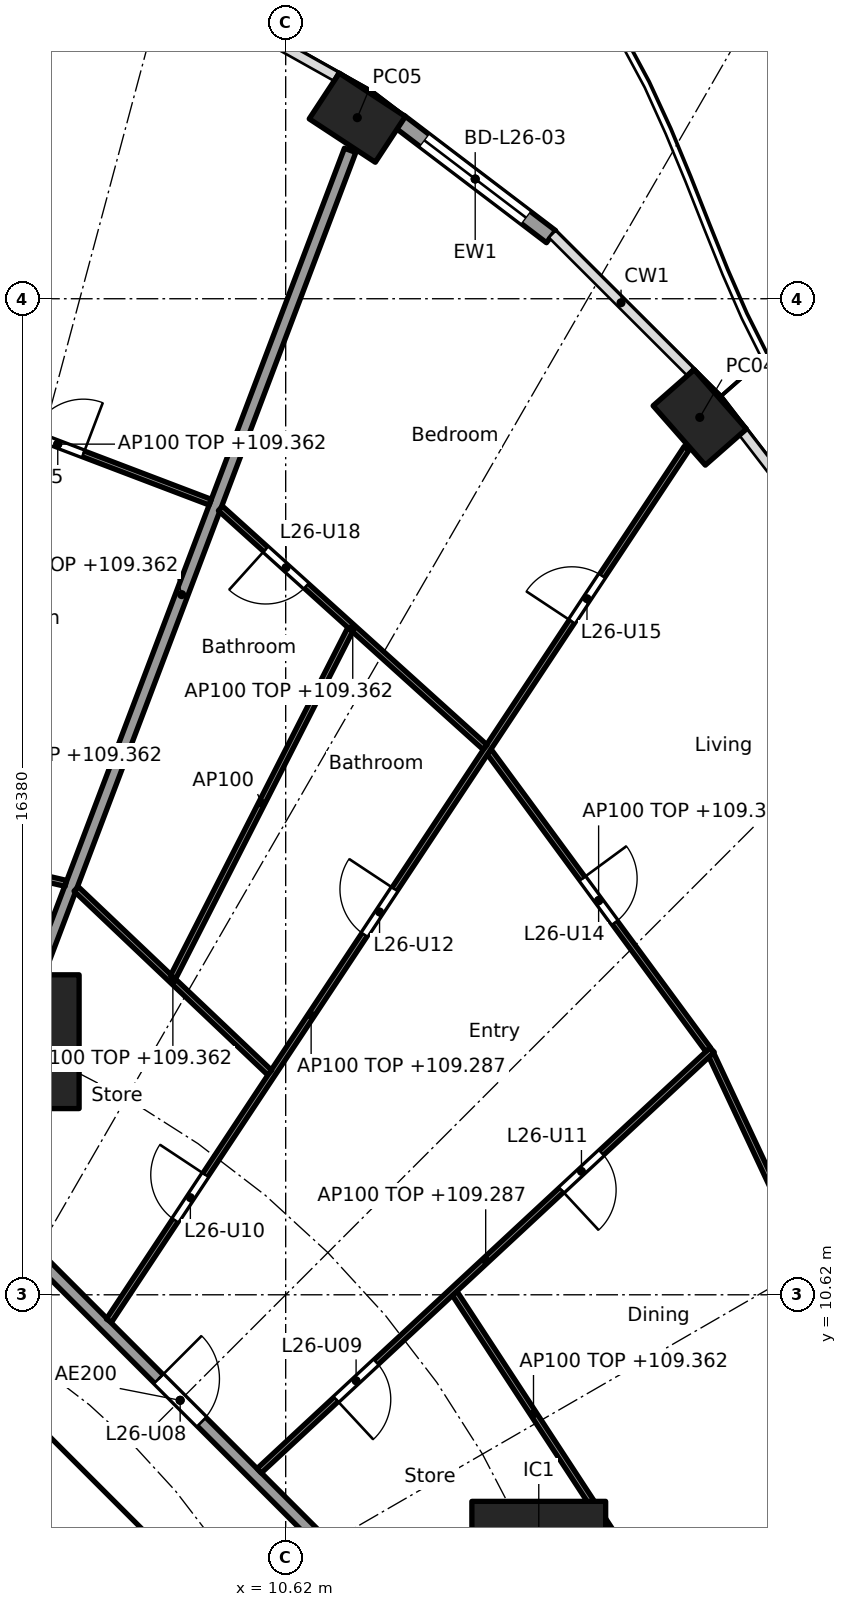
"""IFC4 building model, lengths in metres.
Left out: names, types, materials, properties, quantities, classifications, styles, units other than length and angle.
Written with IfcOpenShell. Run it as: python <this file> out.ifc"""

import sys

from ifc_helpers import new_model, si_unit, direction, frame, frame_2d, origin, origin_2d, place, context, subcontext, project, spatial, rectangle, hollow_rectangle, extrude, element, fill, save


model = new_model("IFC4")
c1 = context("Model", 3, precision=1e-05, world=origin(), true_north=direction((0.0, 1.0)))
c2 = subcontext(c1, "Body", "Model", "MODEL_VIEW")
j1 = project(units=[si_unit("LENGTHUNIT", "METRE"), si_unit("PLANEANGLEUNIT", "RADIAN")], contexts=[c1])
p1 = place(None, origin())
s1 = spatial("IfcSite", under=j1, at=p1, CompositionType="ELEMENT")
p2 = place(p1, origin())
s2 = spatial("IfcBuilding", under=s1, at=p2, CompositionType="ELEMENT")
p3 = place(p2, frame((0.0, 0.0, 106.6)))
s3 = spatial("IfcBuildingStorey", under=s2, at=p3, CompositionType="ELEMENT", Elevation=106.6)
for number, where, z_axis, x_axis in (
    (1, (17.43, 25.049, 0.0), (0.0, 0.0, 1.0), (-0.66, 0.751, 0.0)),
    (2, (11.798, 29.978, 0.0), (0.0, 0.0, 1.0), (-0.836, 0.549, 0.0)),
):
    element("IfcColumn", number, at=place(p3, frame(where, z_axis=z_axis, x_axis=x_axis)), inside=s3, PredefinedType="COLUMN", context=c2, shape_type="SweptSolid", body=[
        extrude(hollow_rectangle(XDim=1.3, YDim=0.9, WallThickness=0.045, at=origin_2d()), origin(), (0.0, 0.0, 1.0), 3.7),
    ])
for number, where, z_axis, x_axis in (
    (3, (14.782, 6.123, 0.0), (0.0, 0.0, 1.0), (1.0, 0.0, 0.0)),
    (4, (6.123, 14.782, 0.0), (0.0, 0.0, 1.0), (1.0, 0.0, 0.0)),
):
    element("IfcColumn", number, at=place(p3, frame(where, z_axis=z_axis, x_axis=x_axis)), inside=s3, PredefinedType="COLUMN", context=c2, shape_type="SweptSolid", body=[
        extrude(rectangle(XDim=2.2, YDim=2.2, at=origin_2d()), origin(), (0.0, 0.0, 1.0), 3.7),
    ])
p4 = place(p3, frame((12.489, 29.917, 0.0), z_axis=(0.0, 0.0, 1.0), x_axis=(0.796037575978, -0.605247203736, 0.0)))
e5 = element("IfcWall", 5, at=p4, inside=s3, PredefinedType="SOLIDWALL", context=c2, shape_type="SweptSolid", body=[
    extrude(rectangle(XDim=3.134, YDim=0.25, at=frame_2d((1.567, 0.0))), origin(), (0.0, 0.0, 1.0), 3.44),
])
p5 = place(p4, frame((0.517, 0.0, 0.0)))
e6 = element("IfcOpeningElement", 6, at=p5, cuts=e5, PredefinedType="OPENING", context=c2, shape_type="SweptSolid", body=[
    extrude(rectangle(XDim=2.1, YDim=2.4, at=frame_2d((1.05, 1.2))), frame((0.0, 0.135, 0.0), z_axis=(0.0, -1.0, 0.0), x_axis=(1.0, 0.0, 0.0)), (0.0, 0.0, 1.0), 0.27),
])
p6 = place(p3, frame((9.988, 4.613, 0.0), z_axis=(0.0, 0.0, 1.0), x_axis=(-0.707106781187, 0.707106781187, 0.0)))
e7 = element("IfcWall", 7, at=p6, inside=s3, PredefinedType="SHEAR", context=c2, shape_type="SweptSolid", body=[
    extrude(rectangle(XDim=7.602, YDim=0.6, at=frame_2d((3.801, 0.0))), origin(), (0.0, 0.0, 1.0), 3.44),
])
p7 = place(p6, frame((3.201, 0.0, 0.0)))
e8 = element("IfcOpeningElement", 8, at=p7, cuts=e7, PredefinedType="OPENING", context=c2, shape_type="SweptSolid", body=[
    extrude(rectangle(XDim=1.2, YDim=2.1, at=frame_2d((0.6, 1.05))), frame((0.0, 0.31, 0.0), z_axis=(0.0, -1.0, 0.0), x_axis=(1.0, 0.0, 0.0)), (0.0, 0.0, 1.0), 0.62),
])
p8 = place(p3, frame((6.141, 14.829, 0.0), z_axis=(0.0, 0.0, 1.0), x_axis=(0.354477134193, 0.935064682968, 0.0)))
e9 = element("IfcWall", 9, at=p8, inside=s3, PredefinedType="PARTITIONING", context=c2, shape_type="SweptSolid", body=[
    extrude(rectangle(XDim=15.626, YDim=0.2, at=frame_2d((7.813, 0.0))), origin(), (0.0, 0.0, 1.0), 2.762),
])
p9 = place(p3, frame((12.635, 5.134, 0.0), z_axis=(0.0, 0.0, 1.0), x_axis=(-0.707106781187, 0.707106781187, 0.0)))
e10 = element("IfcWall", 10, at=p9, inside=s3, PredefinedType="PARTITIONING", context=c2, shape_type="SweptSolid", body=[
    extrude(rectangle(XDim=10.609, YDim=0.2, at=frame_2d((5.305, 0.0))), origin(), (0.0, 0.0, 1.0), 3.44),
])
p10 = place(p9, frame((4.804, 0.0, 0.0)))
e11 = element("IfcOpeningElement", 11, at=p10, cuts=e10, PredefinedType="OPENING", context=c2, shape_type="SweptSolid", body=[
    extrude(rectangle(XDim=1.0, YDim=2.1, at=frame_2d((0.5, 1.05))), frame((0.0, 0.11, 0.0), z_axis=(0.0, -1.0, 0.0), x_axis=(1.0, 0.0, 0.0)), (0.0, 0.0, 1.0), 0.22),
])
p11 = place(p3, frame((15.992, 6.68, 0.0), z_axis=(0.0, 0.0, 1.0), x_axis=(-0.547472878942, 0.836823426311, 0.0)))
e12 = element("IfcWall", 12, at=p11, inside=s3, PredefinedType="PARTITIONING", context=c2, shape_type="SweptSolid", body=[
    extrude(rectangle(XDim=4.738, YDim=0.1, at=frame_2d((2.369, 0.0))), origin(), (0.0, 0.0, 1.0), 2.762),
])
p12 = place(p3, frame((20.252, 8.95, 0.0), z_axis=(0.0, 0.0, 1.0), x_axis=(-0.424580052627, 0.90539040138, 0.0)))
e13 = element("IfcWall", 13, at=p12, inside=s3, PredefinedType="PARTITIONING", context=c2, shape_type="SweptSolid", body=[
    extrude(rectangle(XDim=6.204, YDim=0.1, at=frame_2d((3.102, 0.0))), origin(), (0.0, 0.0, 1.0), 2.762),
])
p13 = place(p3, frame((10.185, 7.726, 0.0), z_axis=(0.0, 0.0, 1.0), x_axis=(0.732598472978, 0.680661059112, 0.0)))
e14 = element("IfcWall", 14, at=p13, inside=s3, PredefinedType="PARTITIONING", context=c2, shape_type="SweptSolid", body=[
    extrude(rectangle(XDim=10.167, YDim=0.1, at=frame_2d((5.084, 0.0))), origin(), (0.0, 0.0, 1.0), 2.687),
])
p14 = place(p13, frame((1.725, 0.0, 0.0)))
e15 = element("IfcOpeningElement", 15, at=p14, cuts=e14, PredefinedType="OPENING", context=c2, shape_type="SweptSolid", body=[
    extrude(rectangle(XDim=0.9, YDim=2.1, at=frame_2d((0.45, 1.05))), frame((0.0, 0.06, 0.0), z_axis=(0.0, -1.0, 0.0), x_axis=(1.0, 0.0, 0.0)), (0.0, 0.0, 1.0), 0.12),
])
p15 = place(p13, frame((6.784, 0.0, 0.0)))
e16 = element("IfcOpeningElement", 16, at=p15, cuts=e14, PredefinedType="OPENING", context=c2, shape_type="SweptSolid", body=[
    extrude(rectangle(XDim=0.9, YDim=2.1, at=frame_2d((0.45, 1.05))), frame((0.0, 0.06, 0.0), z_axis=(0.0, -1.0, 0.0), x_axis=(1.0, 0.0, 0.0)), (0.0, 0.0, 1.0), 0.12),
])
p16 = place(p3, frame((17.567, 14.653, 0.0), z_axis=(0.0, 0.0, 1.0), x_axis=(-0.592391983588, 0.80564988536, 0.0)))
e17 = element("IfcWall", 17, at=p16, inside=s3, PredefinedType="PARTITIONING", context=c2, shape_type="SweptSolid", body=[
    extrude(rectangle(XDim=6.08, YDim=0.1, at=frame_2d((3.04, 0.0))), origin(), (0.0, 0.0, 1.0), 2.762),
])
p17 = place(p16, frame((2.59, 0.0, 0.0)))
e18 = element("IfcOpeningElement", 18, at=p17, cuts=e17, PredefinedType="OPENING", context=c2, shape_type="SweptSolid", body=[
    extrude(rectangle(XDim=0.9, YDim=2.1, at=frame_2d((0.45, 1.05))), frame((0.0, 0.06, 0.0), z_axis=(0.0, -1.0, 0.0), x_axis=(1.0, 0.0, 0.0)), (0.0, 0.0, 1.0), 0.12),
])
p18 = place(p3, frame((7.713, 10.195, 0.0), z_axis=(0.0, 0.0, 1.0), x_axis=(0.552111071171, 0.833770571015, 0.0)))
e19 = element("IfcWall", 19, at=p18, inside=s3, PredefinedType="PARTITIONING", context=c2, shape_type="SweptSolid", body=[
    extrude(rectangle(XDim=17.208, YDim=0.1, at=frame_2d((8.604, 0.0))), origin(), (0.0, 0.0, 1.0), 2.687),
])
p19 = place(p18, frame((1.976, 0.0, 0.0)))
e20 = element("IfcOpeningElement", 20, at=p19, cuts=e19, PredefinedType="OPENING", context=c2, shape_type="SweptSolid", body=[
    extrude(rectangle(XDim=0.9, YDim=2.1, at=frame_2d((0.45, 1.05))), frame((0.0, 0.06, 0.0), z_axis=(0.0, -1.0, 0.0), x_axis=(1.0, 0.0, 0.0)), (0.0, 0.0, 1.0), 0.12),
])
p20 = place(p18, frame((7.611, 0.0, 0.0)))
e21 = element("IfcOpeningElement", 21, at=p20, cuts=e19, PredefinedType="OPENING", context=c2, shape_type="SweptSolid", body=[
    extrude(rectangle(XDim=0.9, YDim=2.1, at=frame_2d((0.45, 1.05))), frame((0.0, 0.06, 0.0), z_axis=(0.0, -1.0, 0.0), x_axis=(1.0, 0.0, 0.0)), (0.0, 0.0, 1.0), 0.12),
])
p21 = place(p18, frame((13.79, 0.0, 0.0)))
e22 = element("IfcOpeningElement", 22, at=p21, cuts=e19, PredefinedType="OPENING", context=c2, shape_type="SweptSolid", body=[
    extrude(rectangle(XDim=0.9, YDim=2.1, at=frame_2d((0.45, 1.05))), frame((0.0, 0.06, 0.0), z_axis=(0.0, -1.0, 0.0), x_axis=(1.0, 0.0, 0.0)), (0.0, 0.0, 1.0), 0.12),
])
p22 = place(p3, frame((10.355, 14.274, 0.0), z_axis=(0.0, 0.0, 1.0), x_axis=(-0.725206433622, 0.688531501555, 0.0)))
e23 = element("IfcWall", 23, at=p22, inside=s3, PredefinedType="PARTITIONING", context=c2, shape_type="SweptSolid", body=[
    extrude(rectangle(XDim=4.387, YDim=0.1, at=frame_2d((2.193, 0.0))), origin(), (0.0, 0.0, 1.0), 2.762),
])
p23 = place(p3, frame((13.898, 19.625, 0.0), z_axis=(0.0, 0.0, 1.0), x_axis=(-0.742396654702, 0.669960601146, 0.0)))
e24 = element("IfcWall", 24, at=p23, inside=s3, PredefinedType="PARTITIONING", context=c2, shape_type="SweptSolid", body=[
    extrude(rectangle(XDim=5.861, YDim=0.1, at=frame_2d((2.931, 0.0))), origin(), (0.0, 0.0, 1.0), 2.762),
])
p24 = place(p23, frame((3.958, 0.0, 0.0)))
e25 = element("IfcOpeningElement", 25, at=p24, cuts=e24, PredefinedType="OPENING", context=c2, shape_type="SweptSolid", body=[
    extrude(rectangle(XDim=0.9, YDim=2.1, at=frame_2d((0.45, 1.05))), frame((0.0, 0.06, 0.0), z_axis=(0.0, -1.0, 0.0), x_axis=(1.0, 0.0, 0.0)), (0.0, 0.0, 1.0), 0.12),
])
p25 = place(p3, frame((8.769, 15.846, 0.0), z_axis=(0.0, 0.0, 1.0), x_axis=(0.454067187552, 0.890967445639, 0.0)))
e26 = element("IfcWall", 26, at=p25, inside=s3, PredefinedType="PARTITIONING", context=c2, shape_type="SweptSolid", body=[
    extrude(rectangle(XDim=6.414, YDim=0.1, at=frame_2d((3.207, 0.0))), origin(), (0.0, 0.0, 1.0), 3.44),
])
p26 = place(p3, frame((7.004, 17.386, 0.0), z_axis=(0.0, 0.0, 1.0), x_axis=(-0.974172890163, 0.22580341023, 0.0)))
e27 = element("IfcWall", 27, at=p26, inside=s3, PredefinedType="PARTITIONING", context=c2, shape_type="SweptSolid", body=[
    extrude(rectangle(XDim=3.702, YDim=0.1, at=frame_2d((1.851, 0.0))), origin(), (0.0, 0.0, 1.0), 2.762),
])
p27 = place(p26, frame((1.611, 0.0, 0.0)))
e28 = element("IfcOpeningElement", 28, at=p27, cuts=e27, PredefinedType="OPENING", context=c2, shape_type="SweptSolid", body=[
    extrude(rectangle(XDim=0.9, YDim=2.1, at=frame_2d((0.45, 1.05))), frame((0.0, 0.06, 0.0), z_axis=(0.0, -1.0, 0.0), x_axis=(1.0, 0.0, 0.0)), (0.0, 0.0, 1.0), 0.12),
])
p28 = place(p3, frame((9.379, 23.655, 0.0), z_axis=(0.0, 0.0, 1.0), x_axis=(-0.934613076136, 0.355666132653, 0.0)))
e29 = element("IfcWall", 29, at=p28, inside=s3, PredefinedType="PARTITIONING", context=c2, shape_type="SweptSolid", body=[
    extrude(rectangle(XDim=5.366, YDim=0.1, at=frame_2d((2.683, 0.0))), origin(), (0.0, 0.0, 1.0), 2.762),
])
p29 = place(p28, frame((2.233, 0.0, 0.0)))
e30 = element("IfcOpeningElement", 30, at=p29, cuts=e29, PredefinedType="OPENING", context=c2, shape_type="SweptSolid", body=[
    extrude(rectangle(XDim=0.9, YDim=2.1, at=frame_2d((0.45, 1.05))), frame((0.0, 0.06, 0.0), z_axis=(0.0, -1.0, 0.0), x_axis=(1.0, 0.0, 0.0)), (0.0, 0.0, 1.0), 0.12),
])
p30 = place(p5, origin())
e31 = element("IfcDoor", 31, at=p30, inside=s3, OperationType="SLIDING_TO_LEFT", PredefinedType="DOOR", context=c2, shape_type="SweptSolid", body=[
    extrude(rectangle(XDim=2.1, YDim=2.4, at=frame_2d((1.05, 1.2))), frame((0.0, 0.025, 0.0), z_axis=(0.0, -1.0, 0.0), x_axis=(1.0, 0.0, 0.0)), (0.0, 0.0, 1.0), 0.05),
])
fill(e6, e31)
p31 = place(p7, origin())
e32 = element("IfcDoor", 32, at=p31, inside=s3, OperationType="SINGLE_SWING_RIGHT", PredefinedType="DOOR", context=c2, shape_type="SweptSolid", body=[
    extrude(rectangle(XDim=1.2, YDim=2.1, at=frame_2d((0.6, 1.05))), frame((0.0, 0.025, 0.0), z_axis=(0.0, -1.0, 0.0), x_axis=(1.0, 0.0, 0.0)), (0.0, 0.0, 1.0), 0.05),
])
fill(e8, e32)
p32 = place(p10, frame((1.0, 0.0, 0.0), x_axis=(-1.0, 0.0, 0.0)))
e33 = element("IfcDoor", 33, at=p32, inside=s3, OperationType="SINGLE_SWING_LEFT", PredefinedType="DOOR", context=c2, shape_type="SweptSolid", body=[
    extrude(rectangle(XDim=1.0, YDim=2.1, at=frame_2d((0.5, 1.05))), frame((0.0, 0.025, 0.0), z_axis=(0.0, -1.0, 0.0), x_axis=(1.0, 0.0, 0.0)), (0.0, 0.0, 1.0), 0.05),
])
fill(e11, e33)
p33 = place(p14, frame((0.9, 0.0, 0.0), x_axis=(-1.0, 0.0, 0.0)))
e34 = element("IfcDoor", 34, at=p33, inside=s3, OperationType="SINGLE_SWING_RIGHT", PredefinedType="DOOR", context=c2, shape_type="SweptSolid", body=[
    extrude(rectangle(XDim=0.9, YDim=2.1, at=frame_2d((0.45, 1.05))), frame((0.0, 0.025, 0.0), z_axis=(0.0, -1.0, 0.0), x_axis=(1.0, 0.0, 0.0)), (0.0, 0.0, 1.0), 0.05),
])
fill(e15, e34)
p34 = place(p19, origin())
e35 = element("IfcDoor", 35, at=p34, inside=s3, OperationType="SINGLE_SWING_RIGHT", PredefinedType="DOOR", context=c2, shape_type="SweptSolid", body=[
    extrude(rectangle(XDim=0.9, YDim=2.1, at=frame_2d((0.45, 1.05))), frame((0.0, 0.025, 0.0), z_axis=(0.0, -1.0, 0.0), x_axis=(1.0, 0.0, 0.0)), (0.0, 0.0, 1.0), 0.05),
])
fill(e20, e35)
p35 = place(p15, frame((0.9, 0.0, 0.0), x_axis=(-1.0, 0.0, 0.0)))
e36 = element("IfcDoor", 36, at=p35, inside=s3, OperationType="SINGLE_SWING_RIGHT", PredefinedType="DOOR", context=c2, shape_type="SweptSolid", body=[
    extrude(rectangle(XDim=0.9, YDim=2.1, at=frame_2d((0.45, 1.05))), frame((0.0, 0.025, 0.0), z_axis=(0.0, -1.0, 0.0), x_axis=(1.0, 0.0, 0.0)), (0.0, 0.0, 1.0), 0.05),
])
fill(e16, e36)
p36 = place(p20, origin())
e37 = element("IfcDoor", 37, at=p36, inside=s3, OperationType="SINGLE_SWING_RIGHT", PredefinedType="DOOR", context=c2, shape_type="SweptSolid", body=[
    extrude(rectangle(XDim=0.9, YDim=2.1, at=frame_2d((0.45, 1.05))), frame((0.0, 0.025, 0.0), z_axis=(0.0, -1.0, 0.0), x_axis=(1.0, 0.0, 0.0)), (0.0, 0.0, 1.0), 0.05),
])
fill(e21, e37)
p37 = place(p17, frame((0.9, 0.0, 0.0), x_axis=(-1.0, 0.0, 0.0)))
e38 = element("IfcDoor", 38, at=p37, inside=s3, OperationType="SINGLE_SWING_LEFT", PredefinedType="DOOR", context=c2, shape_type="SweptSolid", body=[
    extrude(rectangle(XDim=0.9, YDim=2.1, at=frame_2d((0.45, 1.05))), frame((0.0, 0.025, 0.0), z_axis=(0.0, -1.0, 0.0), x_axis=(1.0, 0.0, 0.0)), (0.0, 0.0, 1.0), 0.05),
])
fill(e18, e38)
p38 = place(p21, origin())
e39 = element("IfcDoor", 39, at=p38, inside=s3, OperationType="SINGLE_SWING_LEFT", PredefinedType="DOOR", context=c2, shape_type="SweptSolid", body=[
    extrude(rectangle(XDim=0.9, YDim=2.1, at=frame_2d((0.45, 1.05))), frame((0.0, 0.025, 0.0), z_axis=(0.0, -1.0, 0.0), x_axis=(1.0, 0.0, 0.0)), (0.0, 0.0, 1.0), 0.05),
])
fill(e22, e39)
p39 = place(p24, origin())
e40 = element("IfcDoor", 40, at=p39, inside=s3, OperationType="SINGLE_SWING_RIGHT", PredefinedType="DOOR", context=c2, shape_type="SweptSolid", body=[
    extrude(rectangle(XDim=0.9, YDim=2.1, at=frame_2d((0.45, 1.05))), frame((0.0, 0.025, 0.0), z_axis=(0.0, -1.0, 0.0), x_axis=(1.0, 0.0, 0.0)), (0.0, 0.0, 1.0), 0.05),
])
fill(e25, e40)
p40 = place(p29, frame((0.9, 0.0, 0.0), x_axis=(-1.0, 0.0, 0.0)))
e41 = element("IfcDoor", 41, at=p40, inside=s3, OperationType="SINGLE_SWING_RIGHT", PredefinedType="DOOR", context=c2, shape_type="SweptSolid", body=[
    extrude(rectangle(XDim=0.9, YDim=2.1, at=frame_2d((0.45, 1.05))), frame((0.0, 0.025, 0.0), z_axis=(0.0, -1.0, 0.0), x_axis=(1.0, 0.0, 0.0)), (0.0, 0.0, 1.0), 0.05),
])
fill(e30, e41)
save(model, sys.argv[1])
